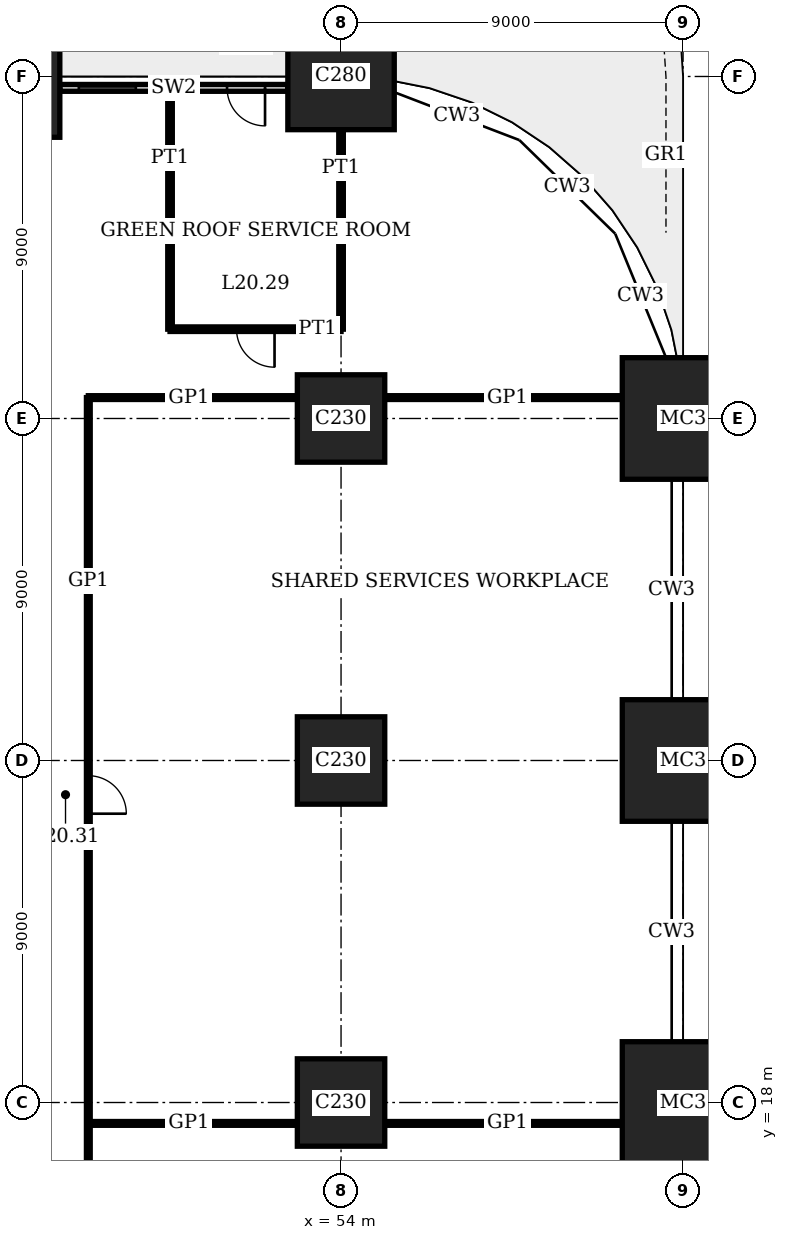
"""IFC4 building model, lengths in metres.
Left out: names, types, materials, properties, quantities, classifications, styles, units other than length and angle.
Written with IfcOpenShell. Run it as: python <this file> out.ifc"""

import sys

from ifc_helpers import new_model, si_unit, direction, frame, frame_2d, origin, origin_2d, place, context, subcontext, project, spatial, rectangle, extrude, element, fill, save


model = new_model("IFC4")
c1 = context("Model", 3, precision=1e-05, world=origin(), true_north=direction((0.0, 1.0)))
c2 = subcontext(c1, "Body", "Model", "MODEL_VIEW")
j1 = project(units=[si_unit("LENGTHUNIT", "METRE"), si_unit("PLANEANGLEUNIT", "RADIAN")], contexts=[c1])
p1 = place(None, origin())
s1 = spatial("IfcSite", under=j1, at=p1, CompositionType="ELEMENT")
p2 = place(p1, origin())
s2 = spatial("IfcBuilding", under=s1, at=p2, CompositionType="ELEMENT")
p3 = place(p2, frame((0.0, 0.0, 85.0)))
s3 = spatial("IfcBuildingStorey", under=s2, at=p3, CompositionType="ELEMENT", Elevation=85.0)
p4 = place(p3, frame((45.0, 45.0, 0.0), z_axis=(0.0, 0.0, 1.0), x_axis=(1.0, 0.0, 0.0)))
e1 = element("IfcColumn", 1, at=p4, inside=s3, PredefinedType="COLUMN", context=c2, shape_type="SweptSolid", body=[
    extrude(rectangle(XDim=3.2, YDim=3.2, at=origin_2d()), origin(), (0.0, 0.0, 1.0), 4.0),
])
for number, where, z_axis, x_axis in (
    (2, (54.0, 18.0, 0.0), (0.0, 0.0, 1.0), (1.0, 0.0, 0.0)),
    (3, (54.0, 27.0, 0.0), (0.0, 0.0, 1.0), (1.0, 0.0, 0.0)),
    (4, (54.0, 36.0, 0.0), (0.0, 0.0, 1.0), (1.0, 0.0, 0.0)),
):
    element("IfcColumn", number, at=place(p3, frame(where, z_axis=z_axis, x_axis=x_axis)), inside=s3, PredefinedType="COLUMN", context=c2, shape_type="SweptSolid", body=[
        extrude(rectangle(XDim=2.3, YDim=2.3, at=origin_2d()), origin(), (0.0, 0.0, 1.0), 4.0),
    ])
p5 = place(p3, frame((54.0, 45.0, 0.0), z_axis=(0.0, 0.0, 1.0), x_axis=(1.0, 0.0, 0.0)))
e5 = element("IfcColumn", 5, at=p5, inside=s3, PredefinedType="COLUMN", context=c2, shape_type="SweptSolid", body=[
    extrude(rectangle(XDim=2.8, YDim=2.8, at=origin_2d()), origin(), (0.0, 0.0, 1.0), 4.0),
])
for number, where, z_axis, x_axis in (
    (6, (63.0, 18.0, 0.0), (0.0, 0.0, 1.0), (1.0, 0.0, 0.0)),
    (7, (63.0, 27.0, 0.0), (0.0, 0.0, 1.0), (1.0, 0.0, 0.0)),
    (8, (63.0, 36.0, 0.0), (0.0, 0.0, 1.0), (1.0, 0.0, 0.0)),
):
    element("IfcColumn", number, at=place(p3, frame(where, z_axis=z_axis, x_axis=x_axis)), inside=s3, PredefinedType="COLUMN", context=c2, shape_type="SweptSolid", body=[
        extrude(rectangle(XDim=3.2, YDim=3.2, at=origin_2d()), origin(), (0.0, 0.0, 1.0), 4.0),
    ])
p6 = place(p3, frame((46.6, 44.7, 0.0), z_axis=(0.0, 0.0, 1.0), x_axis=(1.0, 0.0, 0.0)))
e9 = element("IfcWall", 9, at=p6, inside=s3, PredefinedType="SOLIDWALL", context=c2, shape_type="SweptSolid", body=[
    extrude(rectangle(XDim=6.0, YDim=0.18, at=frame_2d((3.0, 0.0))), origin(), (0.0, 0.0, 1.0), 2.95),
])
p7 = place(p6, frame((4.4, 0.0, 0.0)))
e10 = element("IfcOpeningElement", 10, at=p7, cuts=e9, PredefinedType="OPENING", context=c2, shape_type="SweptSolid", body=[
    extrude(rectangle(XDim=1.0, YDim=2.1, at=frame_2d((0.5, 1.05))), frame((0.0, 0.1, 0.0), z_axis=(0.0, -1.0, 0.0), x_axis=(1.0, 0.0, 0.0)), (0.0, 0.0, 1.0), 0.2),
])
p8 = place(p6, frame((0.5, 0.0, 0.3)))
e11 = element("IfcOpeningElement", 11, at=p8, cuts=e9, PredefinedType="OPENING", context=c2, shape_type="SweptSolid", body=[
    extrude(rectangle(XDim=1.5, YDim=2.4, at=frame_2d((0.75, 1.2))), frame((0.0, 0.1, 0.0), z_axis=(0.0, -1.0, 0.0), x_axis=(1.0, 0.0, 0.0)), (0.0, 0.0, 1.0), 0.2),
])
p9 = place(p3, frame((47.35, 17.45, 0.0), z_axis=(0.0, 0.0, 1.0), x_axis=(1.0, 0.0, 0.0)))
e12 = element("IfcWall", 12, at=p9, inside=s3, PredefinedType="PARTITIONING", context=c2, shape_type="SweptSolid", body=[
    extrude(rectangle(XDim=5.5, YDim=0.1, at=frame_2d((2.75, 0.0))), origin(), (0.0, 0.0, 1.0), 3.75),
])
p10 = place(p3, frame((55.15, 17.45, 0.0), z_axis=(0.0, 0.0, 1.0), x_axis=(1.0, 0.0, 0.0)))
e13 = element("IfcWall", 13, at=p10, inside=s3, PredefinedType="PARTITIONING", context=c2, shape_type="SweptSolid", body=[
    extrude(rectangle(XDim=6.25, YDim=0.1, at=frame_2d((3.125, 0.0))), origin(), (0.0, 0.0, 1.0), 3.75),
])
p11 = place(p3, frame((47.35, 36.55, 0.0), z_axis=(0.0, 0.0, 1.0), x_axis=(1.0, 0.0, 0.0)))
e14 = element("IfcWall", 14, at=p11, inside=s3, PredefinedType="PARTITIONING", context=c2, shape_type="SweptSolid", body=[
    extrude(rectangle(XDim=5.5, YDim=0.1, at=frame_2d((2.75, 0.0))), origin(), (0.0, 0.0, 1.0), 3.75),
])
p12 = place(p3, frame((55.15, 36.55, 0.0), z_axis=(0.0, 0.0, 1.0), x_axis=(1.0, 0.0, 0.0)))
e15 = element("IfcWall", 15, at=p12, inside=s3, PredefinedType="PARTITIONING", context=c2, shape_type="SweptSolid", body=[
    extrude(rectangle(XDim=6.25, YDim=0.1, at=frame_2d((3.125, 0.0))), origin(), (0.0, 0.0, 1.0), 3.75),
])
p13 = place(p3, frame((49.5, 38.35, 0.0), z_axis=(0.0, 0.0, 1.0), x_axis=(1.0, 0.0, 0.0)))
e16 = element("IfcWall", 16, at=p13, inside=s3, PredefinedType="PARTITIONING", context=c2, shape_type="SweptSolid", body=[
    extrude(rectangle(XDim=4.5, YDim=0.12, at=frame_2d((2.25, 0.0))), origin(), (0.0, 0.0, 1.0), 3.75),
])
p14 = place(p13, frame((1.75, 0.0, 0.0)))
e17 = element("IfcOpeningElement", 17, at=p14, cuts=e16, PredefinedType="OPENING", context=c2, shape_type="SweptSolid", body=[
    extrude(rectangle(XDim=1.0, YDim=2.4, at=frame_2d((0.5, 1.2))), frame((0.0, 0.07, 0.0), z_axis=(0.0, -1.0, 0.0), x_axis=(1.0, 0.0, 0.0)), (0.0, 0.0, 1.0), 0.14),
])
p15 = place(p3, frame((47.35, 15.65, 0.0), z_axis=(0.0, 0.0, 1.0), x_axis=(0.0, 1.0, 0.0)))
e18 = element("IfcWall", 18, at=p15, inside=s3, PredefinedType="PARTITIONING", context=c2, shape_type="SweptSolid", body=[
    extrude(rectangle(XDim=20.9, YDim=0.1, at=frame_2d((10.45, 0.0))), origin(), (0.0, 0.0, 1.0), 3.75),
])
p16 = place(p15, frame((9.95, 0.0, 0.0)))
e19 = element("IfcOpeningElement", 19, at=p16, cuts=e18, PredefinedType="OPENING", context=c2, shape_type="SweptSolid", body=[
    extrude(rectangle(XDim=1.0, YDim=2.4, at=frame_2d((0.5, 1.2))), frame((0.0, 0.06, 0.0), z_axis=(0.0, -1.0, 0.0), x_axis=(1.0, 0.0, 0.0)), (0.0, 0.0, 1.0), 0.12),
])
p17 = place(p3, frame((49.5, 38.35, 0.0), z_axis=(0.0, 0.0, 1.0), x_axis=(0.0, 1.0, 0.0)))
e20 = element("IfcWall", 20, at=p17, inside=s3, PredefinedType="PARTITIONING", context=c2, shape_type="SweptSolid", body=[
    extrude(rectangle(XDim=6.34, YDim=0.12, at=frame_2d((3.17, 0.0))), origin(), (0.0, 0.0, 1.0), 3.75),
])
p18 = place(p3, frame((54.0, 38.35, 0.0), z_axis=(0.0, 0.0, 1.0), x_axis=(0.0, 1.0, 0.0)))
e21 = element("IfcWall", 21, at=p18, inside=s3, PredefinedType="PARTITIONING", context=c2, shape_type="SweptSolid", body=[
    extrude(rectangle(XDim=5.25, YDim=0.12, at=frame_2d((2.625, 0.0))), origin(), (0.0, 0.0, 1.0), 3.05),
])
p19 = place(p7, origin())
e22 = element("IfcDoor", 22, at=p19, inside=s3, OperationType="SINGLE_SWING_RIGHT", PredefinedType="DOOR", context=c2, shape_type="SweptSolid", body=[
    extrude(rectangle(XDim=1.0, YDim=2.1, at=frame_2d((0.5, 1.05))), frame((0.0, 0.035, 0.0), z_axis=(0.0, -1.0, 0.0), x_axis=(1.0, 0.0, 0.0)), (0.0, 0.0, 1.0), 0.07),
])
fill(e10, e22)
p20 = place(p8, origin())
e23 = element("IfcWindow", 23, at=p20, inside=s3, PartitioningType="SINGLE_PANEL", PredefinedType="WINDOW", context=c2, shape_type="SweptSolid", body=[
    extrude(rectangle(XDim=1.5, YDim=2.4, at=frame_2d((0.75, 1.2))), frame((0.0, 0.03, 0.0), z_axis=(0.0, -1.0, 0.0), x_axis=(1.0, 0.0, 0.0)), (0.0, 0.0, 1.0), 0.06),
])
fill(e11, e23)
p21 = place(p14, origin())
e24 = element("IfcDoor", 24, at=p21, inside=s3, OperationType="SINGLE_SWING_RIGHT", PredefinedType="DOOR", context=c2, shape_type="SweptSolid", body=[
    extrude(rectangle(XDim=1.0, YDim=2.4, at=frame_2d((0.5, 1.2))), frame((0.0, 0.025, 0.0), z_axis=(0.0, -1.0, 0.0), x_axis=(1.0, 0.0, 0.0)), (0.0, 0.0, 1.0), 0.05),
])
fill(e17, e24)
p22 = place(p16, origin())
e25 = element("IfcDoor", 25, at=p22, inside=s3, OperationType="SINGLE_SWING_LEFT", PredefinedType="DOOR", context=c2, shape_type="SweptSolid", body=[
    extrude(rectangle(XDim=1.0, YDim=2.4, at=frame_2d((0.5, 1.2))), frame((0.0, 0.02, 0.0), z_axis=(0.0, -1.0, 0.0), x_axis=(1.0, 0.0, 0.0)), (0.0, 0.0, 1.0), 0.04),
])
fill(e19, e25)
save(model, sys.argv[1])
